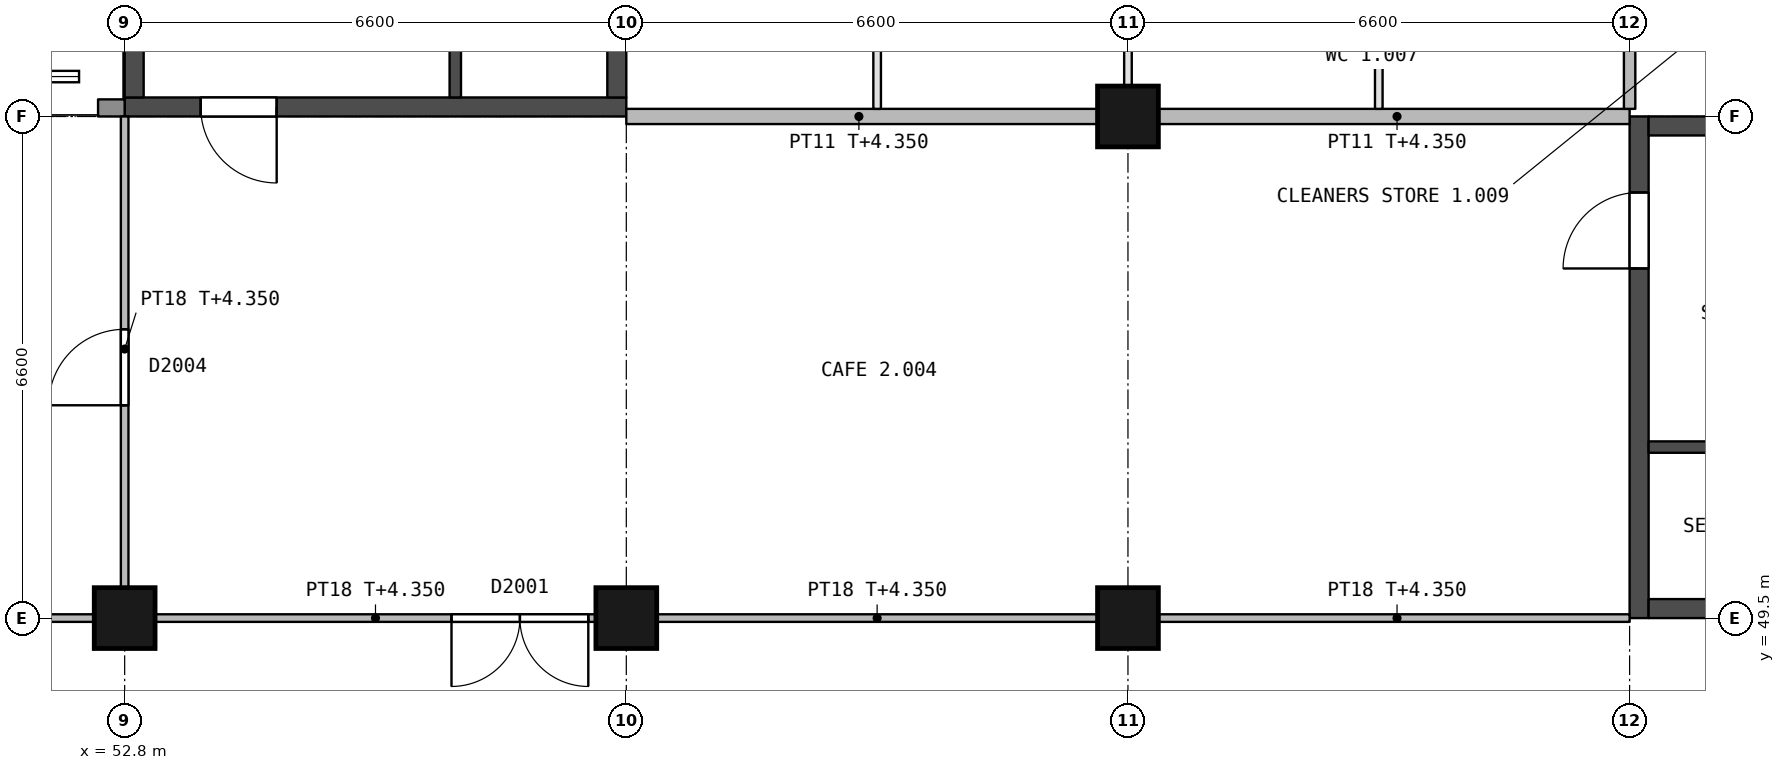
"""IFC4 building model, lengths in metres.
Left out: names, types, materials, properties, quantities, classifications, styles, units other than length and angle.
Written with IfcOpenShell. Run it as: python <this file> out.ifc"""

import sys

from ifc_helpers import new_model, si_unit, direction, frame, frame_2d, origin, origin_2d, place, context, subcontext, project, spatial, rectangle, extrude, element, fill, save


model = new_model("IFC4")
c1 = context("Model", 3, precision=1e-05, world=origin(), true_north=direction((0.0, 1.0)))
c2 = subcontext(c1, "Body", "Model", "MODEL_VIEW")
j1 = project(units=[si_unit("LENGTHUNIT", "METRE"), si_unit("PLANEANGLEUNIT", "RADIAN")], contexts=[c1])
p1 = place(None, origin())
s1 = spatial("IfcSite", under=j1, at=p1, CompositionType="ELEMENT")
p2 = place(p1, origin())
s2 = spatial("IfcBuilding", under=s1, at=p2, CompositionType="ELEMENT")
p3 = place(p2, origin())
s3 = spatial("IfcBuildingStorey", under=s2, at=p3, CompositionType="ELEMENT", Elevation=0.0)
for number, where, z_axis, x_axis in (
    (1, (66.0, 56.1, 0.0), (0.0, 0.0, 1.0), (1.0, 0.0, 0.0)),
    (2, (52.8, 49.5, 0.0), (0.0, 0.0, 1.0), (1.0, 0.0, 0.0)),
    (3, (59.4, 49.5, 0.0), (0.0, 0.0, 1.0), (1.0, 0.0, 0.0)),
    (4, (66.0, 49.5, 0.0), (0.0, 0.0, 1.0), (1.0, 0.0, 0.0)),
):
    element("IfcColumn", number, at=place(p3, frame(where, z_axis=z_axis, x_axis=x_axis)), inside=s3, PredefinedType="COLUMN", context=c2, shape_type="SweptSolid", body=[
        extrude(rectangle(XDim=0.8, YDim=0.8, at=origin_2d()), origin(), (0.0, 0.0, 1.0), 5.4),
    ])
p4 = place(p3, frame((72.725, 56.1, 0.0), z_axis=(0.0, 0.0, 1.0), x_axis=(0.0, -1.0, 0.0)))
e5 = element("IfcWall", 5, at=p4, inside=s3, PredefinedType="SHEAR", context=c2, shape_type="SweptSolid", body=[
    extrude(rectangle(XDim=6.6, YDim=0.25, at=frame_2d((3.3, 0.0))), origin(), (0.0, 0.0, 1.0), 5.15),
])
p5 = place(p4, frame((1.0, 0.0, 0.0)))
e6 = element("IfcOpeningElement", 6, at=p5, cuts=e5, PredefinedType="OPENING", context=c2, shape_type="SweptSolid", body=[
    extrude(rectangle(XDim=1.0, YDim=2.1, at=frame_2d((0.5, 1.05))), frame((0.0, 0.135, 0.0), z_axis=(0.0, -1.0, 0.0), x_axis=(1.0, 0.0, 0.0)), (0.0, 0.0, 1.0), 0.27),
])
for number, where, z_axis, x_axis in (
    (7, (72.85, 55.975, 0.0), (0.0, 0.0, 1.0), (1.0, 0.0, 0.0)),
    (8, (72.85, 49.625, 0.0), (0.0, 0.0, 1.0), (1.0, 0.0, 0.0)),
):
    element("IfcWall", number, at=place(p3, frame(where, z_axis=z_axis, x_axis=x_axis)), inside=s3, PredefinedType="SHEAR", context=c2, shape_type="SweptSolid", body=[
        extrude(rectangle(XDim=6.1, YDim=0.25, at=frame_2d((3.05, 0.0))), origin(), (0.0, 0.0, 1.0), 5.15),
    ])
p6 = place(p3, frame((72.85, 51.75, 0.0), z_axis=(0.0, 0.0, 1.0), x_axis=(1.0, 0.0, 0.0)))
e9 = element("IfcWall", 9, at=p6, inside=s3, PredefinedType="SHEAR", context=c2, shape_type="SweptSolid", body=[
    extrude(rectangle(XDim=3.05, YDim=0.15, at=frame_2d((1.525, 0.0))), origin(), (0.0, 0.0, 1.0), 5.15),
])
p7 = place(p6, frame((0.9, 0.0, 0.0)))
e10 = element("IfcOpeningElement", 10, at=p7, cuts=e9, PredefinedType="OPENING", context=c2, shape_type="SweptSolid", body=[
    extrude(rectangle(XDim=0.9, YDim=2.1, at=frame_2d((0.45, 1.05))), frame((0.0, 0.085, 0.0), z_axis=(0.0, -1.0, 0.0), x_axis=(1.0, 0.0, 0.0)), (0.0, 0.0, 1.0), 0.17),
])
p8 = place(p3, frame((52.8, 56.225, 0.0), z_axis=(0.0, 0.0, 1.0), x_axis=(1.0, 0.0, 0.0)))
e11 = element("IfcWall", 11, at=p8, inside=s3, PredefinedType="SHEAR", context=c2, shape_type="SweptSolid", body=[
    extrude(rectangle(XDim=6.6, YDim=0.25, at=frame_2d((3.3, 0.0))), origin(), (0.0, 0.0, 1.0), 5.15),
])
p9 = place(p8, frame((1.0, 0.0, 0.0)))
e12 = element("IfcOpeningElement", 12, at=p9, cuts=e11, PredefinedType="OPENING", context=c2, shape_type="SweptSolid", body=[
    extrude(rectangle(XDim=1.0, YDim=2.1, at=frame_2d((0.5, 1.05))), frame((0.0, 0.135, 0.0), z_axis=(0.0, -1.0, 0.0), x_axis=(1.0, 0.0, 0.0)), (0.0, 0.0, 1.0), 0.27),
])
p10 = place(p3, frame((52.925, 56.35, 0.0), z_axis=(0.0, 0.0, 1.0), x_axis=(0.0, 1.0, 0.0)))
e13 = element("IfcWall", 13, at=p10, inside=s3, PredefinedType="SHEAR", context=c2, shape_type="SweptSolid", body=[
    extrude(rectangle(XDim=6.1, YDim=0.25, at=frame_2d((3.05, 0.0))), origin(), (0.0, 0.0, 1.0), 5.15),
])
p11 = place(p10, frame((4.125, 0.0, 0.0)))
e14 = element("IfcOpeningElement", 14, at=p11, cuts=e13, PredefinedType="OPENING", context=c2, shape_type="SweptSolid", body=[
    extrude(rectangle(XDim=1.1, YDim=2.4, at=frame_2d((0.55, 1.2))), frame((0.0, 0.135, 0.0), z_axis=(0.0, -1.0, 0.0), x_axis=(1.0, 0.0, 0.0)), (0.0, 0.0, 1.0), 0.27),
])
p12 = place(p3, frame((59.275, 56.35, 0.0), z_axis=(0.0, 0.0, 1.0), x_axis=(0.0, 1.0, 0.0)))
e15 = element("IfcWall", 15, at=p12, inside=s3, PredefinedType="SHEAR", context=c2, shape_type="SweptSolid", body=[
    extrude(rectangle(XDim=6.1, YDim=0.25, at=frame_2d((3.05, 0.0))), origin(), (0.0, 0.0, 1.0), 5.15),
])
p13 = place(p3, frame((57.15, 56.35, 0.0), z_axis=(0.0, 0.0, 1.0), x_axis=(0.0, 1.0, 0.0)))
e16 = element("IfcWall", 16, at=p13, inside=s3, PredefinedType="SHEAR", context=c2, shape_type="SweptSolid", body=[
    extrude(rectangle(XDim=3.05, YDim=0.15, at=frame_2d((1.525, 0.0))), origin(), (0.0, 0.0, 1.0), 5.15),
])
p14 = place(p13, frame((0.9, 0.0, 0.0)))
e17 = element("IfcOpeningElement", 17, at=p14, cuts=e16, PredefinedType="OPENING", context=c2, shape_type="SweptSolid", body=[
    extrude(rectangle(XDim=0.9, YDim=2.1, at=frame_2d((0.45, 1.05))), frame((0.0, 0.085, 0.0), z_axis=(0.0, -1.0, 0.0), x_axis=(1.0, 0.0, 0.0)), (0.0, 0.0, 1.0), 0.17),
])
p15 = place(p3, frame((52.625, 56.1, 0.0), z_axis=(0.0, 0.0, 1.0), x_axis=(0.0, 1.0, 0.0)))
e18 = element("IfcWall", 18, at=p15, inside=s3, PredefinedType="STANDARD", context=c2, shape_type="SweptSolid", body=[
    extrude(rectangle(XDim=0.225, YDim=0.35, at=frame_2d((0.112, 0.0))), origin(), (0.0, 0.0, 1.0), 4.35),
])
p16 = place(p3, frame((46.2, 49.5, 0.0), z_axis=(0.0, 0.0, 1.0), x_axis=(1.0, 0.0, 0.0)))
e19 = element("IfcWall", 19, at=p16, inside=s3, PredefinedType="PARTITIONING", context=c2, shape_type="SweptSolid", body=[
    extrude(rectangle(XDim=6.2, YDim=0.1, at=frame_2d((3.1, 0.0))), origin(), (0.0, 0.0, 1.0), 4.35),
])
p17 = place(p3, frame((59.0, 49.5, 0.0), z_axis=(0.0, 0.0, 1.0), x_axis=(-1.0, 0.0, 0.0)))
e20 = element("IfcWall", 20, at=p17, inside=s3, PredefinedType="PARTITIONING", context=c2, shape_type="SweptSolid", body=[
    extrude(rectangle(XDim=5.8, YDim=0.1, at=frame_2d((2.9, 0.0))), origin(), (0.0, 0.0, 1.0), 4.35),
])
p18 = place(p17, frame((0.1, 0.0, 0.0)))
e21 = element("IfcOpeningElement", 21, at=p18, cuts=e20, PredefinedType="OPENING", context=c2, shape_type="SweptSolid", body=[
    extrude(rectangle(XDim=1.8, YDim=2.4, at=frame_2d((0.9, 1.2))), frame((0.0, 0.06, 0.0), z_axis=(0.0, -1.0, 0.0), x_axis=(1.0, 0.0, 0.0)), (0.0, 0.0, 1.0), 0.12),
])
p19 = place(p3, frame((59.8, 49.5, 0.0), z_axis=(0.0, 0.0, 1.0), x_axis=(1.0, 0.0, 0.0)))
e22 = element("IfcWall", 22, at=p19, inside=s3, PredefinedType="PARTITIONING", context=c2, shape_type="SweptSolid", body=[
    extrude(rectangle(XDim=5.8, YDim=0.1, at=frame_2d((2.9, 0.0))), origin(), (0.0, 0.0, 1.0), 4.35),
])
p20 = place(p3, frame((66.4, 49.5, 0.0), z_axis=(0.0, 0.0, 1.0), x_axis=(1.0, 0.0, 0.0)))
e23 = element("IfcWall", 23, at=p20, inside=s3, PredefinedType="PARTITIONING", context=c2, shape_type="SweptSolid", body=[
    extrude(rectangle(XDim=6.2, YDim=0.1, at=frame_2d((3.1, 0.0))), origin(), (0.0, 0.0, 1.0), 4.35),
])
p21 = place(p3, frame((52.8, 49.9, 0.0), z_axis=(0.0, 0.0, 1.0), x_axis=(0.0, 1.0, 0.0)))
e24 = element("IfcWall", 24, at=p21, inside=s3, PredefinedType="PARTITIONING", context=c2, shape_type="SweptSolid", body=[
    extrude(rectangle(XDim=6.2, YDim=0.1, at=frame_2d((3.1, 0.0))), origin(), (0.0, 0.0, 1.0), 4.35),
])
p22 = place(p21, frame((2.4, 0.0, 0.0)))
e25 = element("IfcOpeningElement", 25, at=p22, cuts=e24, PredefinedType="OPENING", context=c2, shape_type="SweptSolid", body=[
    extrude(rectangle(XDim=1.0, YDim=2.1, at=frame_2d((0.5, 1.05))), frame((0.0, 0.06, 0.0), z_axis=(0.0, -1.0, 0.0), x_axis=(1.0, 0.0, 0.0)), (0.0, 0.0, 1.0), 0.12),
])
for number, where, z_axis, x_axis in (
    (26, (59.4, 56.1, 0.0), (0.0, 0.0, 1.0), (1.0, 0.0, 0.0)),
    (27, (66.4, 56.1, 0.0), (0.0, 0.0, 1.0), (1.0, 0.0, 0.0)),
):
    element("IfcWall", number, at=place(p3, frame(where, z_axis=z_axis, x_axis=x_axis)), inside=s3, PredefinedType="PARTITIONING", context=c2, shape_type="SweptSolid", body=[
        extrude(rectangle(XDim=6.2, YDim=0.2, at=frame_2d((3.1, 0.0))), origin(), (0.0, 0.0, 1.0), 4.35),
    ])
p23 = place(p3, frame((62.7, 56.2, 0.0), z_axis=(0.0, 0.0, 1.0), x_axis=(0.0, 1.0, 0.0)))
e28 = element("IfcWall", 28, at=p23, inside=s3, PredefinedType="PARTITIONING", context=c2, shape_type="SweptSolid", body=[
    extrude(rectangle(XDim=3.15, YDim=0.1, at=frame_2d((1.575, 0.0))), origin(), (0.0, 0.0, 1.0), 4.35),
])
p24 = place(p3, frame((66.0, 56.5, 0.0), z_axis=(0.0, 0.0, 1.0), x_axis=(0.0, 1.0, 0.0)))
e29 = element("IfcWall", 29, at=p24, inside=s3, PredefinedType="PARTITIONING", context=c2, shape_type="SweptSolid", body=[
    extrude(rectangle(XDim=2.85, YDim=0.1, at=frame_2d((1.425, 0.0))), origin(), (0.0, 0.0, 1.0), 4.35),
])
p25 = place(p3, frame((69.3, 56.2, 0.0), z_axis=(0.0, 0.0, 1.0), x_axis=(0.0, 1.0, 0.0)))
e30 = element("IfcWall", 30, at=p25, inside=s3, PredefinedType="PARTITIONING", context=c2, shape_type="SweptSolid", body=[
    extrude(rectangle(XDim=3.15, YDim=0.1, at=frame_2d((1.575, 0.0))), origin(), (0.0, 0.0, 1.0), 4.35),
])
p26 = place(p3, frame((72.6, 56.2, 0.0), z_axis=(0.0, 0.0, 1.0), x_axis=(0.0, 1.0, 0.0)))
e31 = element("IfcWall", 31, at=p26, inside=s3, PredefinedType="PARTITIONING", context=c2, shape_type="SweptSolid", body=[
    extrude(rectangle(XDim=3.125, YDim=0.15, at=frame_2d((1.562, 0.0))), origin(), (0.0, 0.0, 1.0), 4.35),
])
p27 = place(p5, origin())
e32 = element("IfcDoor", 32, at=p27, inside=s3, OperationType="SINGLE_SWING_RIGHT", PredefinedType="DOOR", context=c2, shape_type="SweptSolid", body=[
    extrude(rectangle(XDim=1.0, YDim=2.1, at=frame_2d((0.5, 1.05))), frame((0.0, 0.025, 0.0), z_axis=(0.0, -1.0, 0.0), x_axis=(1.0, 0.0, 0.0)), (0.0, 0.0, 1.0), 0.05),
])
fill(e6, e32)
p28 = place(p9, origin())
e33 = element("IfcDoor", 33, at=p28, inside=s3, OperationType="SINGLE_SWING_RIGHT", PredefinedType="DOOR", context=c2, shape_type="SweptSolid", body=[
    extrude(rectangle(XDim=1.0, YDim=2.1, at=frame_2d((0.5, 1.05))), frame((0.0, 0.025, 0.0), z_axis=(0.0, -1.0, 0.0), x_axis=(1.0, 0.0, 0.0)), (0.0, 0.0, 1.0), 0.05),
])
fill(e12, e33)
p29 = place(p18, origin())
e34 = element("IfcDoor", 34, at=p29, inside=s3, OperationType="DOUBLE_DOOR_SINGLE_SWING", PredefinedType="DOOR", context=c2, shape_type="SweptSolid", body=[
    extrude(rectangle(XDim=1.8, YDim=2.4, at=frame_2d((0.9, 1.2))), frame((0.0, 0.025, 0.0), z_axis=(0.0, -1.0, 0.0), x_axis=(1.0, 0.0, 0.0)), (0.0, 0.0, 1.0), 0.05),
])
fill(e21, e34)
p30 = place(p22, origin())
e35 = element("IfcDoor", 35, at=p30, inside=s3, OperationType="SINGLE_SWING_LEFT", PredefinedType="DOOR", context=c2, shape_type="SweptSolid", body=[
    extrude(rectangle(XDim=1.0, YDim=2.1, at=frame_2d((0.5, 1.05))), frame((0.0, 0.025, 0.0), z_axis=(0.0, -1.0, 0.0), x_axis=(1.0, 0.0, 0.0)), (0.0, 0.0, 1.0), 0.05),
])
fill(e25, e35)
save(model, sys.argv[1])
